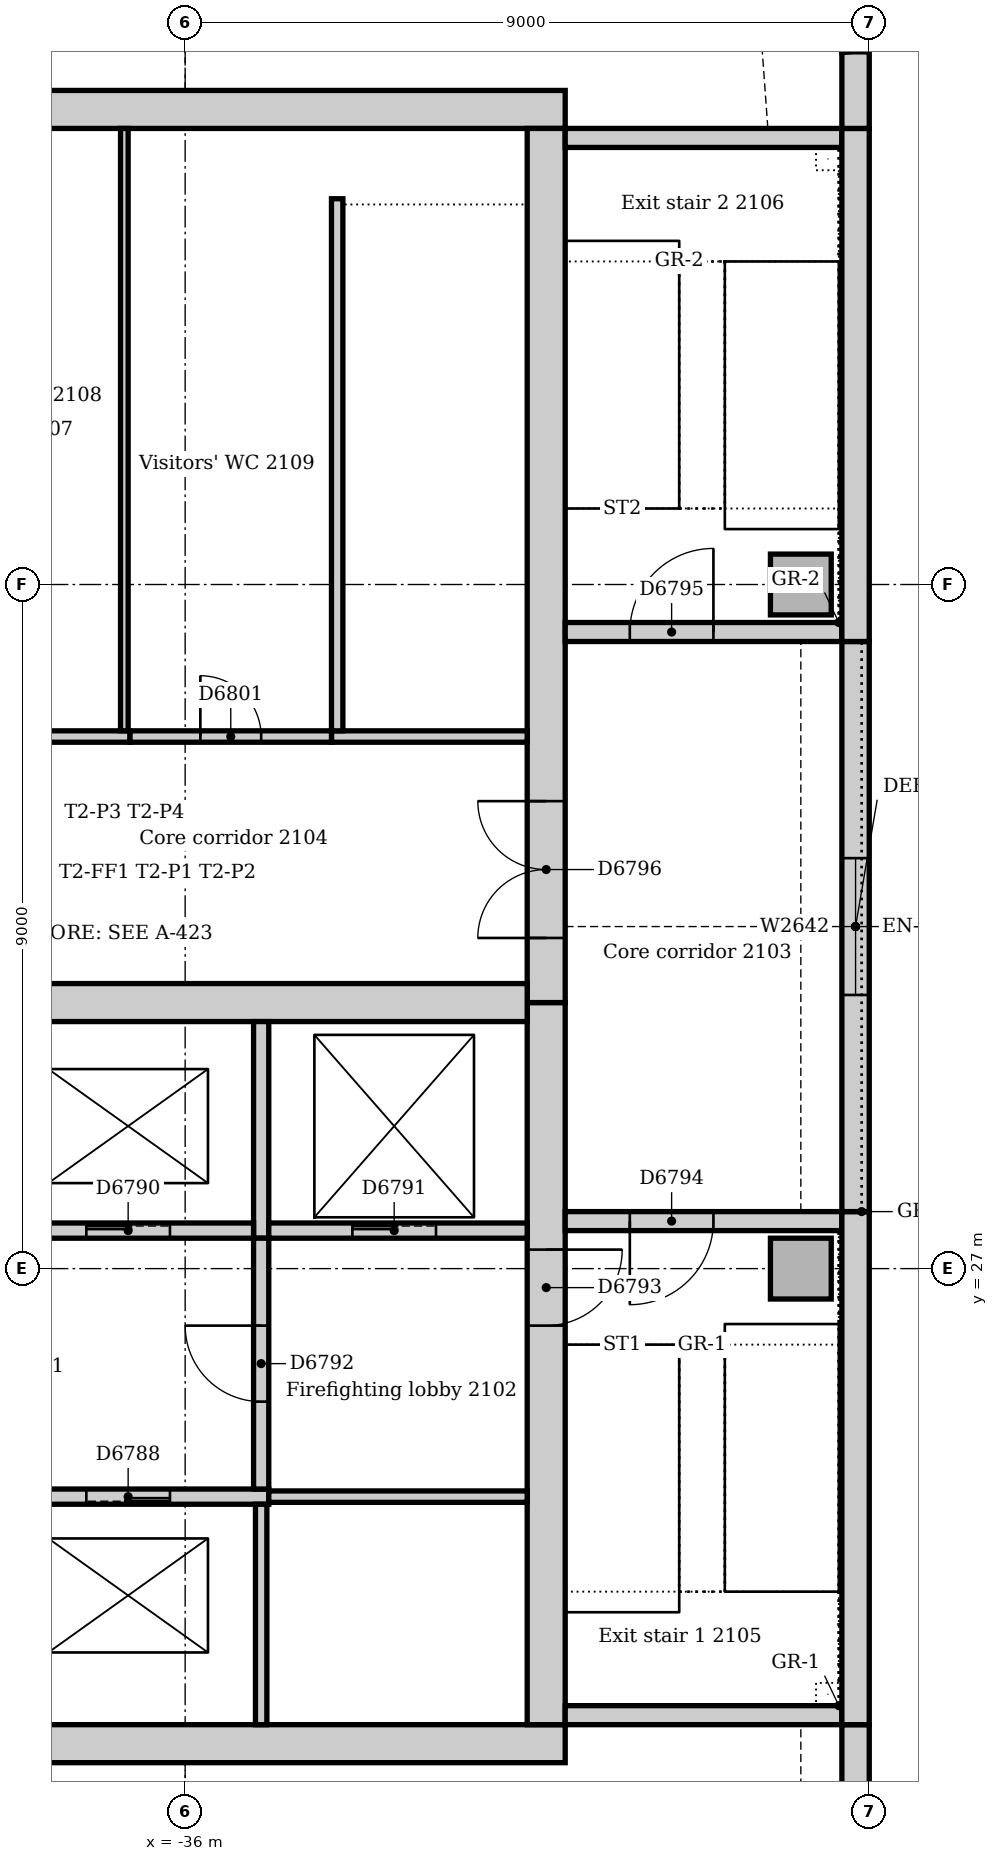
"""IFC4 building model, lengths in metres.
Left out: names, types, materials, properties, quantities, classifications, styles, units other than length and angle.
Written with IfcOpenShell. Run it as: python <this file> out.ifc"""

import sys

from ifc_helpers import new_model, si_unit, direction, frame, frame_2d, origin, origin_2d, place, context, subcontext, project, spatial, rectangle, extrude, element, fill, save


model = new_model("IFC4")
c1 = context("Model", 3, precision=1e-05, world=origin(), true_north=direction((0.0, 1.0)))
c2 = subcontext(c1, "Body", "Model", "MODEL_VIEW")
j1 = project(units=[si_unit("LENGTHUNIT", "METRE"), si_unit("PLANEANGLEUNIT", "RADIAN")], contexts=[c1])
p1 = place(None, origin())
s1 = spatial("IfcSite", under=j1, at=p1, CompositionType="ELEMENT")
p2 = place(p1, origin())
s2 = spatial("IfcBuilding", under=s1, at=p2, CompositionType="ELEMENT")
p3 = place(p2, frame((0.0, 0.0, 91.0)))
s3 = spatial("IfcBuildingStorey", under=s2, at=p3, CompositionType="ELEMENT", Elevation=91.0)
for number, where, z_axis, x_axis in (
    (1, (-42.5, 20.75, 0.0), (0.0, 0.0, 1.0), (1.0, 0.0, 0.0)),
    (2, (-31.0, 42.25, 0.0), (0.0, 0.0, 1.0), (-1.0, 0.0, 0.0)),
):
    element("IfcWall", number, at=place(p3, frame(where, z_axis=z_axis, x_axis=x_axis)), inside=s3, PredefinedType="SOLIDWALL", context=c2, shape_type="SweptSolid", body=[
        extrude(rectangle(XDim=11.5, YDim=0.5, at=frame_2d((5.75, 0.0))), origin(), (0.0, 0.0, 1.0), 4.0),
    ])
p4 = place(p3, frame((-31.25, 21.0, 0.0), z_axis=(0.0, 0.0, 1.0), x_axis=(0.0, 1.0, 0.0)))
e3 = element("IfcWall", 3, at=p4, inside=s3, PredefinedType="SOLIDWALL", context=c2, shape_type="SweptSolid", body=[
    extrude(rectangle(XDim=9.5, YDim=0.5, at=frame_2d((4.75, 0.0))), origin(), (0.0, 0.0, 1.0), 4.0),
])
p5 = place(p4, frame((5.25, 0.0, 0.0)))
e4 = element("IfcOpeningElement", 4, at=p5, cuts=e3, PredefinedType="OPENING", context=c2, shape_type="SweptSolid", body=[
    extrude(rectangle(XDim=1.0, YDim=2.1, at=frame_2d((0.5, 1.05))), frame((0.0, 0.26, 0.0), z_axis=(0.0, -1.0, 0.0), x_axis=(1.0, 0.0, 0.0)), (0.0, 0.0, 1.0), 0.52),
])
p6 = place(p3, frame((-31.25, 30.5, 0.0), z_axis=(0.0, 0.0, 1.0), x_axis=(0.0, 1.0, 0.0)))
e5 = element("IfcWall", 5, at=p6, inside=s3, PredefinedType="SOLIDWALL", context=c2, shape_type="SweptSolid", body=[
    extrude(rectangle(XDim=11.5, YDim=0.5, at=frame_2d((5.75, 0.0))), origin(), (0.0, 0.0, 1.0), 4.0),
])
p7 = place(p6, frame((0.85, 0.0, 0.0)))
e6 = element("IfcOpeningElement", 6, at=p7, cuts=e5, PredefinedType="OPENING", context=c2, shape_type="SweptSolid", body=[
    extrude(rectangle(XDim=1.8, YDim=2.1, at=frame_2d((0.9, 1.05))), frame((0.0, 0.26, 0.0), z_axis=(0.0, -1.0, 0.0), x_axis=(1.0, 0.0, 0.0)), (0.0, 0.0, 1.0), 0.52),
])
p8 = place(p3, frame((-42.0, 30.5, 0.0), z_axis=(0.0, 0.0, 1.0), x_axis=(1.0, 0.0, 0.0)))
e7 = element("IfcWall", 7, at=p8, inside=s3, PredefinedType="SOLIDWALL", context=c2, shape_type="SweptSolid", body=[
    extrude(rectangle(XDim=10.5, YDim=0.5, at=frame_2d((5.25, 0.0))), origin(), (0.0, 0.0, 1.0), 4.0),
])
p9 = place(p3, frame((-31.0, 21.125, 0.0), z_axis=(0.0, 0.0, 1.0), x_axis=(1.0, 0.0, 0.0)))
e8 = element("IfcWall", 8, at=p9, inside=s3, PredefinedType="SOLIDWALL", context=c2, shape_type="SweptSolid", body=[
    extrude(rectangle(XDim=3.64, YDim=0.25, at=frame_2d((1.82, 0.0))), origin(), (0.0, 0.0, 1.0), 4.0),
])
p10 = place(p3, frame((-27.36, 27.625, 0.0), z_axis=(0.0, 0.0, 1.0), x_axis=(-1.0, 0.0, 0.0)))
e9 = element("IfcWall", 9, at=p10, inside=s3, PredefinedType="SOLIDWALL", context=c2, shape_type="SweptSolid", body=[
    extrude(rectangle(XDim=3.64, YDim=0.25, at=frame_2d((1.82, 0.0))), origin(), (0.0, 0.0, 1.0), 4.0),
])
p11 = place(p10, frame((1.69, 0.0, 0.0)))
e10 = element("IfcOpeningElement", 10, at=p11, cuts=e9, PredefinedType="OPENING", context=c2, shape_type="SweptSolid", body=[
    extrude(rectangle(XDim=1.1, YDim=2.1, at=frame_2d((0.55, 1.05))), frame((0.0, 0.135, 0.0), z_axis=(0.0, -1.0, 0.0), x_axis=(1.0, 0.0, 0.0)), (0.0, 0.0, 1.0), 0.27),
])
p12 = place(p3, frame((-31.0, 35.375, 0.0), z_axis=(0.0, 0.0, 1.0), x_axis=(1.0, 0.0, 0.0)))
e11 = element("IfcWall", 11, at=p12, inside=s3, PredefinedType="SOLIDWALL", context=c2, shape_type="SweptSolid", body=[
    extrude(rectangle(XDim=3.64, YDim=0.25, at=frame_2d((1.82, 0.0))), origin(), (0.0, 0.0, 1.0), 4.0),
])
p13 = place(p12, frame((0.85, 0.0, 0.0)))
e12 = element("IfcOpeningElement", 12, at=p13, cuts=e11, PredefinedType="OPENING", context=c2, shape_type="SweptSolid", body=[
    extrude(rectangle(XDim=1.1, YDim=2.1, at=frame_2d((0.55, 1.05))), frame((0.0, 0.135, 0.0), z_axis=(0.0, -1.0, 0.0), x_axis=(1.0, 0.0, 0.0)), (0.0, 0.0, 1.0), 0.27),
])
p14 = place(p3, frame((-27.36, 41.875, 0.0), z_axis=(0.0, 0.0, 1.0), x_axis=(-1.0, 0.0, 0.0)))
e13 = element("IfcWall", 13, at=p14, inside=s3, PredefinedType="SOLIDWALL", context=c2, shape_type="SweptSolid", body=[
    extrude(rectangle(XDim=3.64, YDim=0.25, at=frame_2d((1.82, 0.0))), origin(), (0.0, 0.0, 1.0), 4.0),
])
for number, where, z_axis, x_axis in (
    (14, (-27.9, 27.0, 0.0), (0.0, 0.0, 1.0), (1.0, 0.0, 0.0)),
    (15, (-27.9, 36.0, 0.0), (0.0, 0.0, 1.0), (1.0, 0.0, 0.0)),
):
    element("IfcColumn", number, at=place(p3, frame(where, z_axis=z_axis, x_axis=x_axis)), inside=s3, PredefinedType="COLUMN", context=c2, shape_type="SweptSolid", body=[
        extrude(rectangle(XDim=0.8, YDim=0.8, at=origin_2d()), origin(), (0.0, 0.0, 1.0), 4.0),
    ])
p15 = place(p3, frame((-27.18, 13.243, 0.0), z_axis=(0.0, 0.0, 1.0), x_axis=(0.0, 1.0, 0.0)))
e16 = element("IfcWall", 16, at=p15, inside=s3, PredefinedType="STANDARD", context=c2, shape_type="SweptSolid", body=[
    extrude(rectangle(XDim=7.757, YDim=0.36, at=frame_2d((3.879, 0.0))), origin(), (0.0, 0.0, 1.0), 3.7),
])
p16 = place(p15, frame((1.982, 0.0, 0.9)))
e17 = element("IfcOpeningElement", 17, at=p16, cuts=e16, PredefinedType="OPENING", context=c2, shape_type="SweptSolid", body=[
    extrude(rectangle(XDim=3.3, YDim=1.6, at=frame_2d((1.65, 0.8))), frame((0.0, 0.19, 0.0), z_axis=(0.0, -1.0, 0.0), x_axis=(1.0, 0.0, 0.0)), (0.0, 0.0, 1.0), 0.38),
])
p17 = place(p3, frame((-27.18, 21.0, 0.0), z_axis=(0.0, 0.0, 1.0), x_axis=(0.0, 1.0, 0.0)))
e18 = element("IfcWall", 18, at=p17, inside=s3, PredefinedType="STANDARD", context=c2, shape_type="SweptSolid", body=[
    extrude(rectangle(XDim=6.75, YDim=0.36, at=frame_2d((3.375, 0.0))), origin(), (0.0, 0.0, 1.0), 3.7),
])
p18 = place(p3, frame((-27.18, 27.75, 0.0), z_axis=(0.0, 0.0, 1.0), x_axis=(0.0, 1.0, 0.0)))
e19 = element("IfcWall", 19, at=p18, inside=s3, PredefinedType="STANDARD", context=c2, shape_type="SweptSolid", body=[
    extrude(rectangle(XDim=7.5, YDim=0.36, at=frame_2d((3.75, 0.0))), origin(), (0.0, 0.0, 1.0), 3.7),
])
p19 = place(p18, frame((2.85, 0.0, 1.2)))
e20 = element("IfcOpeningElement", 20, at=p19, cuts=e19, PredefinedType="OPENING", context=c2, shape_type="SweptSolid", body=[
    extrude(rectangle(XDim=1.8, YDim=1.2, at=frame_2d((0.9, 0.6))), frame((0.0, 0.19, 0.0), z_axis=(0.0, -1.0, 0.0), x_axis=(1.0, 0.0, 0.0)), (0.0, 0.0, 1.0), 0.38),
])
p20 = place(p3, frame((-27.18, 35.25, 0.0), z_axis=(0.0, 0.0, 1.0), x_axis=(0.0, 1.0, 0.0)))
e21 = element("IfcWall", 21, at=p20, inside=s3, PredefinedType="STANDARD", context=c2, shape_type="SweptSolid", body=[
    extrude(rectangle(XDim=6.75, YDim=0.36, at=frame_2d((3.375, 0.0))), origin(), (0.0, 0.0, 1.0), 3.7),
])
p21 = place(p3, frame((-27.18, 42.0, 0.0), z_axis=(0.0, 0.0, 1.0), x_axis=(0.0, 1.0, 0.0)))
e22 = element("IfcWall", 22, at=p21, inside=s3, PredefinedType="STANDARD", context=c2, shape_type="SweptSolid", body=[
    extrude(rectangle(XDim=1.007, YDim=0.36, at=frame_2d((0.504, 0.0))), origin(), (0.0, 0.0, 1.0), 3.7),
])
p22 = place(p3, frame((-27.183, 43.019, 0.0), z_axis=(0.0, 0.0, 1.0), x_axis=(-0.13055608231, 0.99144092581, 0.0)))
e23 = element("IfcWall", 23, at=p22, inside=s3, PredefinedType="STANDARD", context=c2, shape_type="SweptSolid", body=[
    extrude(rectangle(XDim=0.713, YDim=0.36, at=frame_2d((0.356, 0.0))), origin(), (0.0, 0.0, 1.0), 3.7),
])
p23 = place(p3, frame((-34.9, 24.0, 0.0), z_axis=(0.0, 0.0, 1.0), x_axis=(-1.0, 0.0, 0.0)))
e24 = element("IfcWall", 24, at=p23, inside=s3, PredefinedType="SOLIDWALL", context=c2, shape_type="SweptSolid", body=[
    extrude(rectangle(XDim=3.5, YDim=0.2, at=frame_2d((1.75, 0.0))), origin(), (0.0, 0.0, 1.0), 4.0),
])
p24 = place(p23, frame((1.3, 0.0, 0.0)))
e25 = element("IfcOpeningElement", 25, at=p24, cuts=e24, PredefinedType="OPENING", context=c2, shape_type="SweptSolid", body=[
    extrude(rectangle(XDim=1.1, YDim=2.1, at=frame_2d((0.55, 1.05))), frame((0.0, 0.11, 0.0), z_axis=(0.0, -1.0, 0.0), x_axis=(1.0, 0.0, 0.0)), (0.0, 0.0, 1.0), 0.22),
])
p25 = place(p3, frame((-35.0, 27.4, 0.0), z_axis=(0.0, 0.0, 1.0), x_axis=(0.0, 1.0, 0.0)))
e26 = element("IfcWall", 26, at=p25, inside=s3, PredefinedType="SOLIDWALL", context=c2, shape_type="SweptSolid", body=[
    extrude(rectangle(XDim=2.85, YDim=0.2, at=frame_2d((1.425, 0.0))), origin(), (0.0, 0.0, 1.0), 4.0),
])
p26 = place(p3, frame((-38.4, 27.5, 0.0), z_axis=(0.0, 0.0, 1.0), x_axis=(1.0, 0.0, 0.0)))
e27 = element("IfcWall", 27, at=p26, inside=s3, PredefinedType="SOLIDWALL", context=c2, shape_type="SweptSolid", body=[
    extrude(rectangle(XDim=3.3, YDim=0.2, at=frame_2d((1.65, 0.0))), origin(), (0.0, 0.0, 1.0), 4.0),
])
p27 = place(p26, frame((1.1, 0.0, 0.0)))
e28 = element("IfcOpeningElement", 28, at=p27, cuts=e27, PredefinedType="OPENING", context=c2, shape_type="SweptSolid", body=[
    extrude(rectangle(XDim=1.1, YDim=2.1, at=frame_2d((0.55, 1.05))), frame((0.0, 0.11, 0.0), z_axis=(0.0, -1.0, 0.0), x_axis=(1.0, 0.0, 0.0)), (0.0, 0.0, 1.0), 0.22),
])
p28 = place(p3, frame((-34.9, 27.5, 0.0), z_axis=(0.0, 0.0, 1.0), x_axis=(1.0, 0.0, 0.0)))
e29 = element("IfcWall", 29, at=p28, inside=s3, PredefinedType="SOLIDWALL", context=c2, shape_type="SweptSolid", body=[
    extrude(rectangle(XDim=3.4, YDim=0.2, at=frame_2d((1.7, 0.0))), origin(), (0.0, 0.0, 1.0), 4.0),
])
p29 = place(p28, frame((1.1, 0.0, 0.0)))
e30 = element("IfcOpeningElement", 30, at=p29, cuts=e29, PredefinedType="OPENING", context=c2, shape_type="SweptSolid", body=[
    extrude(rectangle(XDim=1.1, YDim=2.1, at=frame_2d((0.55, 1.05))), frame((0.0, 0.11, 0.0), z_axis=(0.0, -1.0, 0.0), x_axis=(1.0, 0.0, 0.0)), (0.0, 0.0, 1.0), 0.22),
])
p30 = place(p3, frame((-35.0, 24.1, 0.0), z_axis=(0.0, 0.0, 1.0), x_axis=(0.0, 1.0, 0.0)))
e31 = element("IfcWall", 31, at=p30, inside=s3, PredefinedType="SOLIDWALL", context=c2, shape_type="SweptSolid", body=[
    extrude(rectangle(XDim=3.3, YDim=0.2, at=frame_2d((1.65, 0.0))), origin(), (0.0, 0.0, 1.0), 4.0),
])
p31 = place(p30, frame((1.15, 0.0, 0.0)))
e32 = element("IfcOpeningElement", 32, at=p31, cuts=e31, PredefinedType="OPENING", context=c2, shape_type="SweptSolid", body=[
    extrude(rectangle(XDim=1.0, YDim=2.1, at=frame_2d((0.5, 1.05))), frame((0.0, 0.11, 0.0), z_axis=(0.0, -1.0, 0.0), x_axis=(1.0, 0.0, 0.0)), (0.0, 0.0, 1.0), 0.22),
])
p32 = place(p3, frame((-35.0, 21.0, 0.0), z_axis=(0.0, 0.0, 1.0), x_axis=(0.0, 1.0, 0.0)))
e33 = element("IfcWall", 33, at=p32, inside=s3, PredefinedType="SOLIDWALL", context=c2, shape_type="SweptSolid", body=[
    extrude(rectangle(XDim=2.9, YDim=0.15, at=frame_2d((1.45, 0.0))), origin(), (0.0, 0.0, 1.0), 4.0),
])
p33 = place(p3, frame((-31.5, 24.0, 0.0), z_axis=(0.0, 0.0, 1.0), x_axis=(-1.0, 0.0, 0.0)))
e34 = element("IfcWall", 34, at=p33, inside=s3, PredefinedType="SOLIDWALL", context=c2, shape_type="SweptSolid", body=[
    extrude(rectangle(XDim=3.4, YDim=0.15, at=frame_2d((1.7, 0.0))), origin(), (0.0, 0.0, 1.0), 4.0),
])
p34 = place(p3, frame((-34.075, 34.0, 0.0), z_axis=(0.0, 0.0, 1.0), x_axis=(1.0, 0.0, 0.0)))
e35 = element("IfcWall", 35, at=p34, inside=s3, PredefinedType="SOLIDWALL", context=c2, shape_type="SweptSolid", body=[
    extrude(rectangle(XDim=2.575, YDim=0.15, at=frame_2d((1.288, 0.0))), origin(), (0.0, 0.0, 1.0), 4.0),
])
p35 = place(p3, frame((-34.0, 41.075, 0.0), z_axis=(0.0, 0.0, 1.0), x_axis=(0.0, -1.0, 0.0)))
e36 = element("IfcWall", 36, at=p35, inside=s3, PredefinedType="SOLIDWALL", context=c2, shape_type="SweptSolid", body=[
    extrude(rectangle(XDim=7.0, YDim=0.15, at=frame_2d((3.5, 0.0))), origin(), (0.0, 0.0, 1.0), 4.0),
])
p36 = place(p3, frame((-36.725, 34.0, 0.0), z_axis=(0.0, 0.0, 1.0), x_axis=(-1.0, 0.0, 0.0)))
e37 = element("IfcWall", 37, at=p36, inside=s3, PredefinedType="PARTITIONING", context=c2, shape_type="SweptSolid", body=[
    extrude(rectangle(XDim=3.2, YDim=0.15, at=frame_2d((1.6, 0.0))), origin(), (0.0, 0.0, 1.0), 3.7),
])
p37 = place(p36, frame((1.275, 0.0, 0.0)))
e38 = element("IfcOpeningElement", 38, at=p37, cuts=e37, PredefinedType="OPENING", context=c2, shape_type="SweptSolid", body=[
    extrude(rectangle(XDim=0.8, YDim=2.1, at=frame_2d((0.4, 1.05))), frame((0.0, 0.085, 0.0), z_axis=(0.0, -1.0, 0.0), x_axis=(1.0, 0.0, 0.0)), (0.0, 0.0, 1.0), 0.17),
])
p38 = place(p3, frame((-34.075, 34.0, 0.0), z_axis=(0.0, 0.0, 1.0), x_axis=(-1.0, 0.0, 0.0)))
e39 = element("IfcWall", 39, at=p38, inside=s3, PredefinedType="PARTITIONING", context=c2, shape_type="SweptSolid", body=[
    extrude(rectangle(XDim=2.65, YDim=0.15, at=frame_2d((1.325, 0.0))), origin(), (0.0, 0.0, 1.0), 3.7),
])
p39 = place(p38, frame((0.925, 0.0, 0.0)))
e40 = element("IfcOpeningElement", 40, at=p39, cuts=e39, PredefinedType="OPENING", context=c2, shape_type="SweptSolid", body=[
    extrude(rectangle(XDim=0.8, YDim=2.1, at=frame_2d((0.4, 1.05))), frame((0.0, 0.085, 0.0), z_axis=(0.0, -1.0, 0.0), x_axis=(1.0, 0.0, 0.0)), (0.0, 0.0, 1.0), 0.17),
])
p40 = place(p3, frame((-36.8, 34.075, 0.0), z_axis=(0.0, 0.0, 1.0), x_axis=(0.0, 1.0, 0.0)))
e41 = element("IfcWall", 41, at=p40, inside=s3, PredefinedType="PARTITIONING", context=c2, shape_type="SweptSolid", body=[
    extrude(rectangle(XDim=7.925, YDim=0.1, at=frame_2d((3.962, 0.0))), origin(), (0.0, 0.0, 1.0), 3.7),
])
p41 = place(p19, origin())
e42 = element("IfcWindow", 42, at=p41, inside=s3, PartitioningType="SINGLE_PANEL", PredefinedType="WINDOW", context=c2, shape_type="SweptSolid", body=[
    extrude(rectangle(XDim=1.8, YDim=1.2, at=frame_2d((0.9, 0.6))), frame((0.0, 0.13, 0.0), z_axis=(0.0, -1.0, 0.0), x_axis=(1.0, 0.0, 0.0)), (0.0, 0.0, 1.0), 0.06),
])
fill(e20, e42)
p42 = place(p24, origin())
e43 = element("IfcDoor", 43, at=p42, inside=s3, OperationType="SLIDING_TO_LEFT", PredefinedType="DOOR", context=c2, shape_type="SweptSolid", body=[
    extrude(rectangle(XDim=1.1, YDim=2.1, at=frame_2d((0.55, 1.05))), frame((0.0, 0.025, 0.0), z_axis=(0.0, -1.0, 0.0), x_axis=(1.0, 0.0, 0.0)), (0.0, 0.0, 1.0), 0.05),
])
fill(e25, e43)
p43 = place(p27, origin())
e44 = element("IfcDoor", 44, at=p43, inside=s3, OperationType="SLIDING_TO_LEFT", PredefinedType="DOOR", context=c2, shape_type="SweptSolid", body=[
    extrude(rectangle(XDim=1.1, YDim=2.1, at=frame_2d((0.55, 1.05))), frame((0.0, 0.025, 0.0), z_axis=(0.0, -1.0, 0.0), x_axis=(1.0, 0.0, 0.0)), (0.0, 0.0, 1.0), 0.05),
])
fill(e28, e44)
p44 = place(p29, origin())
e45 = element("IfcDoor", 45, at=p44, inside=s3, OperationType="SLIDING_TO_LEFT", PredefinedType="DOOR", context=c2, shape_type="SweptSolid", body=[
    extrude(rectangle(XDim=1.1, YDim=2.1, at=frame_2d((0.55, 1.05))), frame((0.0, 0.025, 0.0), z_axis=(0.0, -1.0, 0.0), x_axis=(1.0, 0.0, 0.0)), (0.0, 0.0, 1.0), 0.05),
])
fill(e30, e45)
p45 = place(p31, origin())
e46 = element("IfcDoor", 46, at=p45, inside=s3, OperationType="SINGLE_SWING_RIGHT", PredefinedType="DOOR", context=c2, shape_type="SweptSolid", body=[
    extrude(rectangle(XDim=1.0, YDim=2.1, at=frame_2d((0.5, 1.05))), frame((0.0, 0.025, 0.0), z_axis=(0.0, -1.0, 0.0), x_axis=(1.0, 0.0, 0.0)), (0.0, 0.0, 1.0), 0.05),
])
fill(e32, e46)
p46 = place(p5, frame((1.0, 0.0, 0.0), z_axis=(0.0, 0.0, 1.0), x_axis=(-1.0, 0.0, 0.0)))
e47 = element("IfcDoor", 47, at=p46, inside=s3, OperationType="SINGLE_SWING_LEFT", PredefinedType="DOOR", context=c2, shape_type="SweptSolid", body=[
    extrude(rectangle(XDim=1.0, YDim=2.1, at=frame_2d((0.5, 1.05))), frame((0.0, 0.025, 0.0), z_axis=(0.0, -1.0, 0.0), x_axis=(1.0, 0.0, 0.0)), (0.0, 0.0, 1.0), 0.05),
])
fill(e4, e47)
p47 = place(p11, origin())
e48 = element("IfcDoor", 48, at=p47, inside=s3, OperationType="SINGLE_SWING_RIGHT", PredefinedType="DOOR", context=c2, shape_type="SweptSolid", body=[
    extrude(rectangle(XDim=1.1, YDim=2.1, at=frame_2d((0.55, 1.05))), frame((0.0, 0.025, 0.0), z_axis=(0.0, -1.0, 0.0), x_axis=(1.0, 0.0, 0.0)), (0.0, 0.0, 1.0), 0.05),
])
fill(e10, e48)
p48 = place(p13, origin())
e49 = element("IfcDoor", 49, at=p48, inside=s3, OperationType="SINGLE_SWING_RIGHT", PredefinedType="DOOR", context=c2, shape_type="SweptSolid", body=[
    extrude(rectangle(XDim=1.1, YDim=2.1, at=frame_2d((0.55, 1.05))), frame((0.0, 0.025, 0.0), z_axis=(0.0, -1.0, 0.0), x_axis=(1.0, 0.0, 0.0)), (0.0, 0.0, 1.0), 0.05),
])
fill(e12, e49)
p49 = place(p7, origin())
e50 = element("IfcDoor", 50, at=p49, inside=s3, OperationType="DOUBLE_DOOR_SINGLE_SWING", PredefinedType="DOOR", context=c2, shape_type="SweptSolid", body=[
    extrude(rectangle(XDim=1.8, YDim=2.1, at=frame_2d((0.9, 1.05))), frame((0.0, 0.025, 0.0), z_axis=(0.0, -1.0, 0.0), x_axis=(1.0, 0.0, 0.0)), (0.0, 0.0, 1.0), 0.05),
])
fill(e6, e50)
p50 = place(p39, frame((0.8, 0.0, 0.0), z_axis=(0.0, 0.0, 1.0), x_axis=(-1.0, 0.0, 0.0)))
e51 = element("IfcDoor", 51, at=p50, inside=s3, OperationType="SINGLE_SWING_LEFT", PredefinedType="DOOR", context=c2, shape_type="SweptSolid", body=[
    extrude(rectangle(XDim=0.8, YDim=2.1, at=frame_2d((0.4, 1.05))), frame((0.0, 0.025, 0.0), z_axis=(0.0, -1.0, 0.0), x_axis=(1.0, 0.0, 0.0)), (0.0, 0.0, 1.0), 0.05),
])
fill(e40, e51)
save(model, sys.argv[1])
